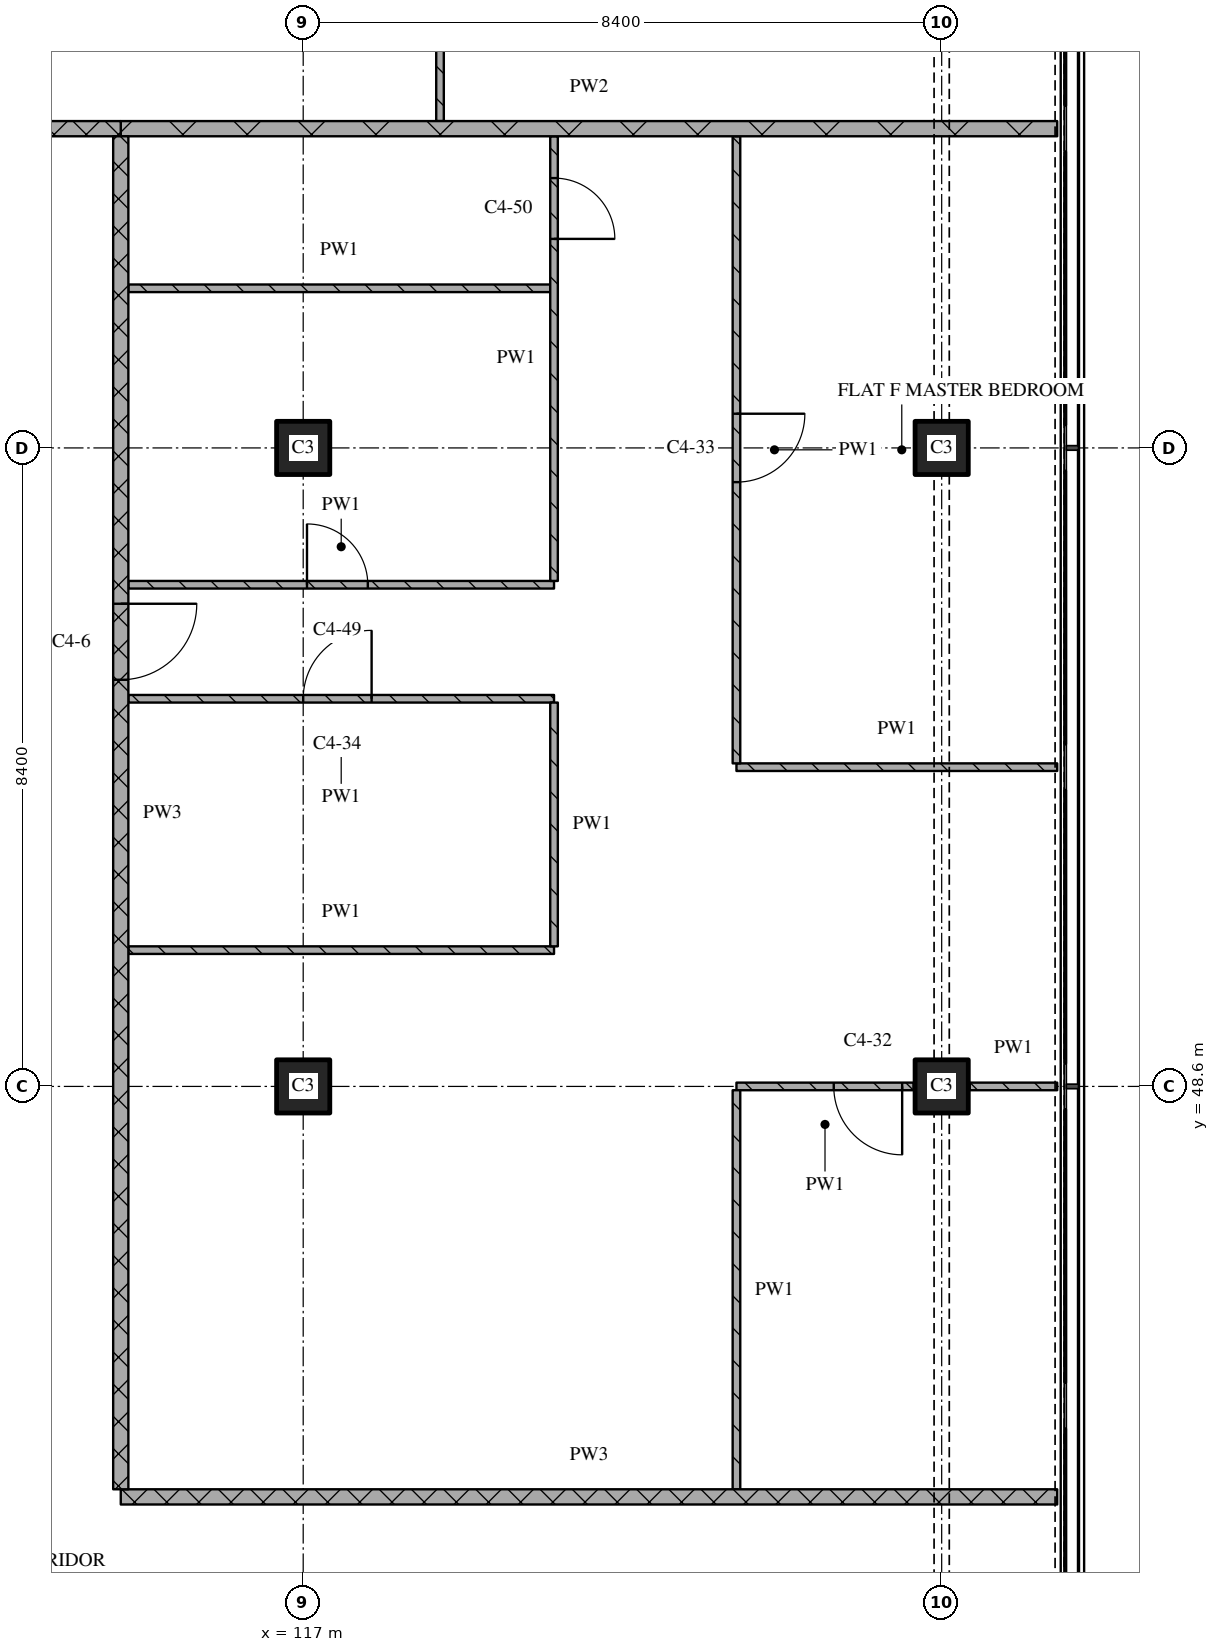
"""IFC4 building model, lengths in metres.
Left out: names, types, materials, properties, quantities, classifications, styles, units other than length and angle.
Written with IfcOpenShell. Run it as: python <this file> out.ifc"""

import sys

from ifc_helpers import new_model, si_unit, direction, frame, frame_2d, origin, origin_2d, place, context, subcontext, project, spatial, rectangle, extrude, element, fill, save


model = new_model("IFC4")
c1 = context("Model", 3, precision=1e-05, world=origin(), true_north=direction((0.0, 1.0)))
c2 = subcontext(c1, "Body", "Model", "MODEL_VIEW")
j1 = project(units=[si_unit("LENGTHUNIT", "METRE"), si_unit("PLANEANGLEUNIT", "RADIAN")], contexts=[c1])
p1 = place(None, origin())
s1 = spatial("IfcSite", under=j1, at=p1, CompositionType="ELEMENT")
p2 = place(p1, origin())
s2 = spatial("IfcBuilding", under=s1, at=p2, CompositionType="ELEMENT")
p3 = place(p2, frame((0.0, 0.0, 179.85)))
s3 = spatial("IfcBuildingStorey", under=s2, at=p3, CompositionType="ELEMENT", Elevation=179.85)
for number, where, z_axis, x_axis in (
    (1, (117.0, 48.6, 0.0), (0.0, 0.0, 1.0), (1.0, 0.0, 0.0)),
    (2, (117.0, 57.0, 0.0), (0.0, 0.0, 1.0), (1.0, 0.0, 0.0)),
    (3, (125.4, 48.6, 0.0), (0.0, 0.0, 1.0), (1.0, 0.0, 0.0)),
    (4, (125.4, 57.0, 0.0), (0.0, 0.0, 1.0), (1.0, 0.0, 0.0)),
):
    element("IfcColumn", number, at=place(p3, frame(where, z_axis=z_axis, x_axis=x_axis)), inside=s3, PredefinedType="COLUMN", context=c2, shape_type="SweptSolid", body=[
        extrude(rectangle(XDim=0.7, YDim=0.7, at=origin_2d()), origin(), (0.0, 0.0, 1.0), 3.6),
    ])
p4 = place(p3, frame((114.6, 43.2, 0.0), z_axis=(0.0, 0.0, 1.0), x_axis=(1.0, 0.0, 0.0)))
e5 = element("IfcWall", 5, at=p4, inside=s3, PredefinedType="PARTITIONING", context=c2, shape_type="SweptSolid", body=[
    extrude(rectangle(XDim=12.32, YDim=0.2, at=frame_2d((6.16, 0.0))), origin(), (0.0, 0.0, 1.0), 3.32),
])
p5 = place(p3, frame((125.03, 48.6, 0.0), z_axis=(0.0, 0.0, 1.0), x_axis=(-1.0, 0.0, 0.0)))
e6 = element("IfcWall", 6, at=p5, inside=s3, PredefinedType="PARTITIONING", context=c2, shape_type="SweptSolid", body=[
    extrude(rectangle(XDim=2.33, YDim=0.1, at=frame_2d((1.165, 0.0))), origin(), (0.0, 0.0, 1.0), 3.32),
])
p6 = place(p5, frame((0.15, 0.0, 0.0)))
e7 = element("IfcOpeningElement", 7, at=p6, cuts=e6, PredefinedType="OPENING", context=c2, shape_type="SweptSolid", body=[
    extrude(rectangle(XDim=0.9, YDim=2.1, at=frame_2d((0.45, 1.05))), frame((0.0, 0.06, 0.0), z_axis=(0.0, -1.0, 0.0), x_axis=(1.0, 0.0, 0.0)), (0.0, 0.0, 1.0), 0.12),
])
p7 = place(p3, frame((125.77, 48.6, 0.0), z_axis=(0.0, 0.0, 1.0), x_axis=(1.0, 0.0, 0.0)))
e8 = element("IfcWall", 8, at=p7, inside=s3, PredefinedType="PARTITIONING", context=c2, shape_type="SweptSolid", body=[
    extrude(rectangle(XDim=1.15, YDim=0.1, at=frame_2d((0.575, 0.0))), origin(), (0.0, 0.0, 1.0), 3.32),
])
p8 = place(p3, frame((114.7, 50.393, 0.0), z_axis=(0.0, 0.0, 1.0), x_axis=(1.0, 0.0, 0.0)))
e9 = element("IfcWall", 9, at=p8, inside=s3, PredefinedType="PARTITIONING", context=c2, shape_type="SweptSolid", body=[
    extrude(rectangle(XDim=5.6, YDim=0.1, at=frame_2d((2.8, 0.0))), origin(), (0.0, 0.0, 1.0), 3.32),
])
p9 = place(p3, frame((122.7, 52.8, 0.0), z_axis=(0.0, 0.0, 1.0), x_axis=(1.0, 0.0, 0.0)))
e10 = element("IfcWall", 10, at=p9, inside=s3, PredefinedType="PARTITIONING", context=c2, shape_type="SweptSolid", body=[
    extrude(rectangle(XDim=4.22, YDim=0.1, at=frame_2d((2.11, 0.0))), origin(), (0.0, 0.0, 1.0), 3.32),
])
p10 = place(p3, frame((120.3, 53.7, 0.0), z_axis=(0.0, 0.0, 1.0), x_axis=(-1.0, 0.0, 0.0)))
e11 = element("IfcWall", 11, at=p10, inside=s3, PredefinedType="PARTITIONING", context=c2, shape_type="SweptSolid", body=[
    extrude(rectangle(XDim=5.6, YDim=0.1, at=frame_2d((2.8, 0.0))), origin(), (0.0, 0.0, 1.0), 3.32),
])
p11 = place(p10, frame((2.4, 0.0, 0.0)))
e12 = element("IfcOpeningElement", 12, at=p11, cuts=e11, PredefinedType="OPENING", context=c2, shape_type="SweptSolid", body=[
    extrude(rectangle(XDim=0.9, YDim=2.1, at=frame_2d((0.45, 1.05))), frame((0.0, 0.06, 0.0), z_axis=(0.0, -1.0, 0.0), x_axis=(1.0, 0.0, 0.0)), (0.0, 0.0, 1.0), 0.12),
])
p12 = place(p3, frame((114.7, 55.2, 0.0), z_axis=(0.0, 0.0, 1.0), x_axis=(1.0, 0.0, 0.0)))
e13 = element("IfcWall", 13, at=p12, inside=s3, PredefinedType="PARTITIONING", context=c2, shape_type="SweptSolid", body=[
    extrude(rectangle(XDim=5.6, YDim=0.1, at=frame_2d((2.8, 0.0))), origin(), (0.0, 0.0, 1.0), 3.32),
])
p13 = place(p12, frame((2.35, 0.0, 0.0)))
e14 = element("IfcOpeningElement", 14, at=p13, cuts=e13, PredefinedType="OPENING", context=c2, shape_type="SweptSolid", body=[
    extrude(rectangle(XDim=0.8, YDim=2.1, at=frame_2d((0.4, 1.05))), frame((0.0, 0.06, 0.0), z_axis=(0.0, -1.0, 0.0), x_axis=(1.0, 0.0, 0.0)), (0.0, 0.0, 1.0), 0.12),
])
p14 = place(p3, frame((114.7, 59.1, 0.0), z_axis=(0.0, 0.0, 1.0), x_axis=(1.0, 0.0, 0.0)))
e15 = element("IfcWall", 15, at=p14, inside=s3, PredefinedType="PARTITIONING", context=c2, shape_type="SweptSolid", body=[
    extrude(rectangle(XDim=5.55, YDim=0.1, at=frame_2d((2.775, 0.0))), origin(), (0.0, 0.0, 1.0), 3.32),
])
p15 = place(p3, frame((111.0, 61.2, 0.0), z_axis=(0.0, 0.0, 1.0), x_axis=(1.0, 0.0, 0.0)))
e16 = element("IfcWall", 16, at=p15, inside=s3, PredefinedType="PARTITIONING", context=c2, shape_type="SweptSolid", body=[
    extrude(rectangle(XDim=3.6, YDim=0.2, at=frame_2d((1.8, 0.0))), origin(), (0.0, 0.0, 1.0), 3.32),
])
p16 = place(p3, frame((114.6, 61.2, 0.0), z_axis=(0.0, 0.0, 1.0), x_axis=(1.0, 0.0, 0.0)))
e17 = element("IfcWall", 17, at=p16, inside=s3, PredefinedType="PARTITIONING", context=c2, shape_type="SweptSolid", body=[
    extrude(rectangle(XDim=12.32, YDim=0.2, at=frame_2d((6.16, 0.0))), origin(), (0.0, 0.0, 1.0), 3.32),
])
p17 = place(p3, frame((114.6, 61.1, 0.0), z_axis=(0.0, 0.0, 1.0), x_axis=(0.0, -1.0, 0.0)))
e18 = element("IfcWall", 18, at=p17, inside=s3, PredefinedType="PARTITIONING", context=c2, shape_type="SweptSolid", body=[
    extrude(rectangle(XDim=17.8, YDim=0.2, at=frame_2d((8.9, 0.0))), origin(), (0.0, 0.0, 1.0), 3.32),
])
p18 = place(p17, frame((6.15, 0.0, 0.0)))
e19 = element("IfcOpeningElement", 19, at=p18, cuts=e18, PredefinedType="OPENING", context=c2, shape_type="SweptSolid", body=[
    extrude(rectangle(XDim=1.0, YDim=2.1, at=frame_2d((0.5, 1.05))), frame((0.0, 0.11, 0.0), z_axis=(0.0, -1.0, 0.0), x_axis=(1.0, 0.0, 0.0)), (0.0, 0.0, 1.0), 0.22),
])
p19 = place(p3, frame((118.8, 61.3, 0.0), z_axis=(0.0, 0.0, 1.0), x_axis=(0.0, 1.0, 0.0)))
e20 = element("IfcWall", 20, at=p19, inside=s3, PredefinedType="PARTITIONING", context=c2, shape_type="SweptSolid", body=[
    extrude(rectangle(XDim=3.15, YDim=0.1, at=frame_2d((1.575, 0.0))), origin(), (0.0, 0.0, 1.0), 3.32),
])
p20 = place(p19, frame((1.15, 0.0, 0.0)))
e21 = element("IfcOpeningElement", 21, at=p20, cuts=e20, PredefinedType="OPENING", context=c2, shape_type="SweptSolid", body=[
    extrude(rectangle(XDim=0.8, YDim=2.1, at=frame_2d((0.4, 1.05))), frame((0.0, 0.06, 0.0), z_axis=(0.0, -1.0, 0.0), x_axis=(1.0, 0.0, 0.0)), (0.0, 0.0, 1.0), 0.12),
])
p21 = place(p3, frame((120.3, 53.65, 0.0), z_axis=(0.0, 0.0, 1.0), x_axis=(0.0, -1.0, 0.0)))
e22 = element("IfcWall", 22, at=p21, inside=s3, PredefinedType="PARTITIONING", context=c2, shape_type="SweptSolid", body=[
    extrude(rectangle(XDim=3.207, YDim=0.1, at=frame_2d((1.604, 0.0))), origin(), (0.0, 0.0, 1.0), 3.32),
])
p22 = place(p3, frame((120.3, 55.25, 0.0), z_axis=(0.0, 0.0, 1.0), x_axis=(0.0, 1.0, 0.0)))
e23 = element("IfcWall", 23, at=p22, inside=s3, PredefinedType="PARTITIONING", context=c2, shape_type="SweptSolid", body=[
    extrude(rectangle(XDim=5.85, YDim=0.1, at=frame_2d((2.925, 0.0))), origin(), (0.0, 0.0, 1.0), 3.32),
])
p23 = place(p22, frame((4.5, 0.0, 0.0)))
e24 = element("IfcOpeningElement", 24, at=p23, cuts=e23, PredefinedType="OPENING", context=c2, shape_type="SweptSolid", body=[
    extrude(rectangle(XDim=0.8, YDim=2.1, at=frame_2d((0.4, 1.05))), frame((0.0, 0.06, 0.0), z_axis=(0.0, -1.0, 0.0), x_axis=(1.0, 0.0, 0.0)), (0.0, 0.0, 1.0), 0.12),
])
p24 = place(p3, frame((122.7, 48.55, 0.0), z_axis=(0.0, 0.0, 1.0), x_axis=(0.0, -1.0, 0.0)))
e25 = element("IfcWall", 25, at=p24, inside=s3, PredefinedType="PARTITIONING", context=c2, shape_type="SweptSolid", body=[
    extrude(rectangle(XDim=5.25, YDim=0.1, at=frame_2d((2.625, 0.0))), origin(), (0.0, 0.0, 1.0), 3.32),
])
p25 = place(p3, frame((122.7, 61.1, 0.0), z_axis=(0.0, 0.0, 1.0), x_axis=(0.0, -1.0, 0.0)))
e26 = element("IfcWall", 26, at=p25, inside=s3, PredefinedType="PARTITIONING", context=c2, shape_type="SweptSolid", body=[
    extrude(rectangle(XDim=8.25, YDim=0.1, at=frame_2d((4.125, 0.0))), origin(), (0.0, 0.0, 1.0), 3.32),
])
p26 = place(p25, frame((3.65, 0.0, 0.0)))
e27 = element("IfcOpeningElement", 27, at=p26, cuts=e26, PredefinedType="OPENING", context=c2, shape_type="SweptSolid", body=[
    extrude(rectangle(XDim=0.9, YDim=2.1, at=frame_2d((0.45, 1.05))), frame((0.0, 0.06, 0.0), z_axis=(0.0, -1.0, 0.0), x_axis=(1.0, 0.0, 0.0)), (0.0, 0.0, 1.0), 0.12),
])
p27 = place(p6, origin())
e28 = element("IfcDoor", 28, at=p27, inside=s3, OperationType="SINGLE_SWING_LEFT", PredefinedType="DOOR", context=c2, shape_type="SweptSolid", body=[
    extrude(rectangle(XDim=0.9, YDim=2.1, at=frame_2d((0.45, 1.05))), frame((0.0, 0.025, 0.0), z_axis=(0.0, -1.0, 0.0), x_axis=(1.0, 0.0, 0.0)), (0.0, 0.0, 1.0), 0.05),
])
fill(e7, e28)
p28 = place(p11, origin())
e29 = element("IfcDoor", 29, at=p28, inside=s3, OperationType="SINGLE_SWING_RIGHT", PredefinedType="DOOR", context=c2, shape_type="SweptSolid", body=[
    extrude(rectangle(XDim=0.9, YDim=2.1, at=frame_2d((0.45, 1.05))), frame((0.0, 0.025, 0.0), z_axis=(0.0, -1.0, 0.0), x_axis=(1.0, 0.0, 0.0)), (0.0, 0.0, 1.0), 0.05),
])
fill(e12, e29)
p29 = place(p13, origin())
e30 = element("IfcDoor", 30, at=p29, inside=s3, OperationType="SINGLE_SWING_LEFT", PredefinedType="DOOR", context=c2, shape_type="SweptSolid", body=[
    extrude(rectangle(XDim=0.8, YDim=2.1, at=frame_2d((0.4, 1.05))), frame((0.0, 0.025, 0.0), z_axis=(0.0, -1.0, 0.0), x_axis=(1.0, 0.0, 0.0)), (0.0, 0.0, 1.0), 0.05),
])
fill(e14, e30)
p30 = place(p18, origin())
e31 = element("IfcDoor", 31, at=p30, inside=s3, OperationType="SINGLE_SWING_LEFT", PredefinedType="DOOR", context=c2, shape_type="SweptSolid", body=[
    extrude(rectangle(XDim=1.0, YDim=2.1, at=frame_2d((0.5, 1.05))), frame((0.0, 0.025, 0.0), z_axis=(0.0, -1.0, 0.0), x_axis=(1.0, 0.0, 0.0)), (0.0, 0.0, 1.0), 0.05),
])
fill(e19, e31)
p31 = place(p23, origin())
e32 = element("IfcDoor", 32, at=p31, inside=s3, OperationType="SINGLE_SWING_RIGHT", PredefinedType="DOOR", context=c2, shape_type="SweptSolid", body=[
    extrude(rectangle(XDim=0.8, YDim=2.1, at=frame_2d((0.4, 1.05))), frame((0.0, 0.025, 0.0), z_axis=(0.0, -1.0, 0.0), x_axis=(1.0, 0.0, 0.0)), (0.0, 0.0, 1.0), 0.05),
])
fill(e24, e32)
p32 = place(p26, origin())
e33 = element("IfcDoor", 33, at=p32, inside=s3, OperationType="SINGLE_SWING_LEFT", PredefinedType="DOOR", context=c2, shape_type="SweptSolid", body=[
    extrude(rectangle(XDim=0.9, YDim=2.1, at=frame_2d((0.45, 1.05))), frame((0.0, 0.025, 0.0), z_axis=(0.0, -1.0, 0.0), x_axis=(1.0, 0.0, 0.0)), (0.0, 0.0, 1.0), 0.05),
])
fill(e27, e33)
save(model, sys.argv[1])
